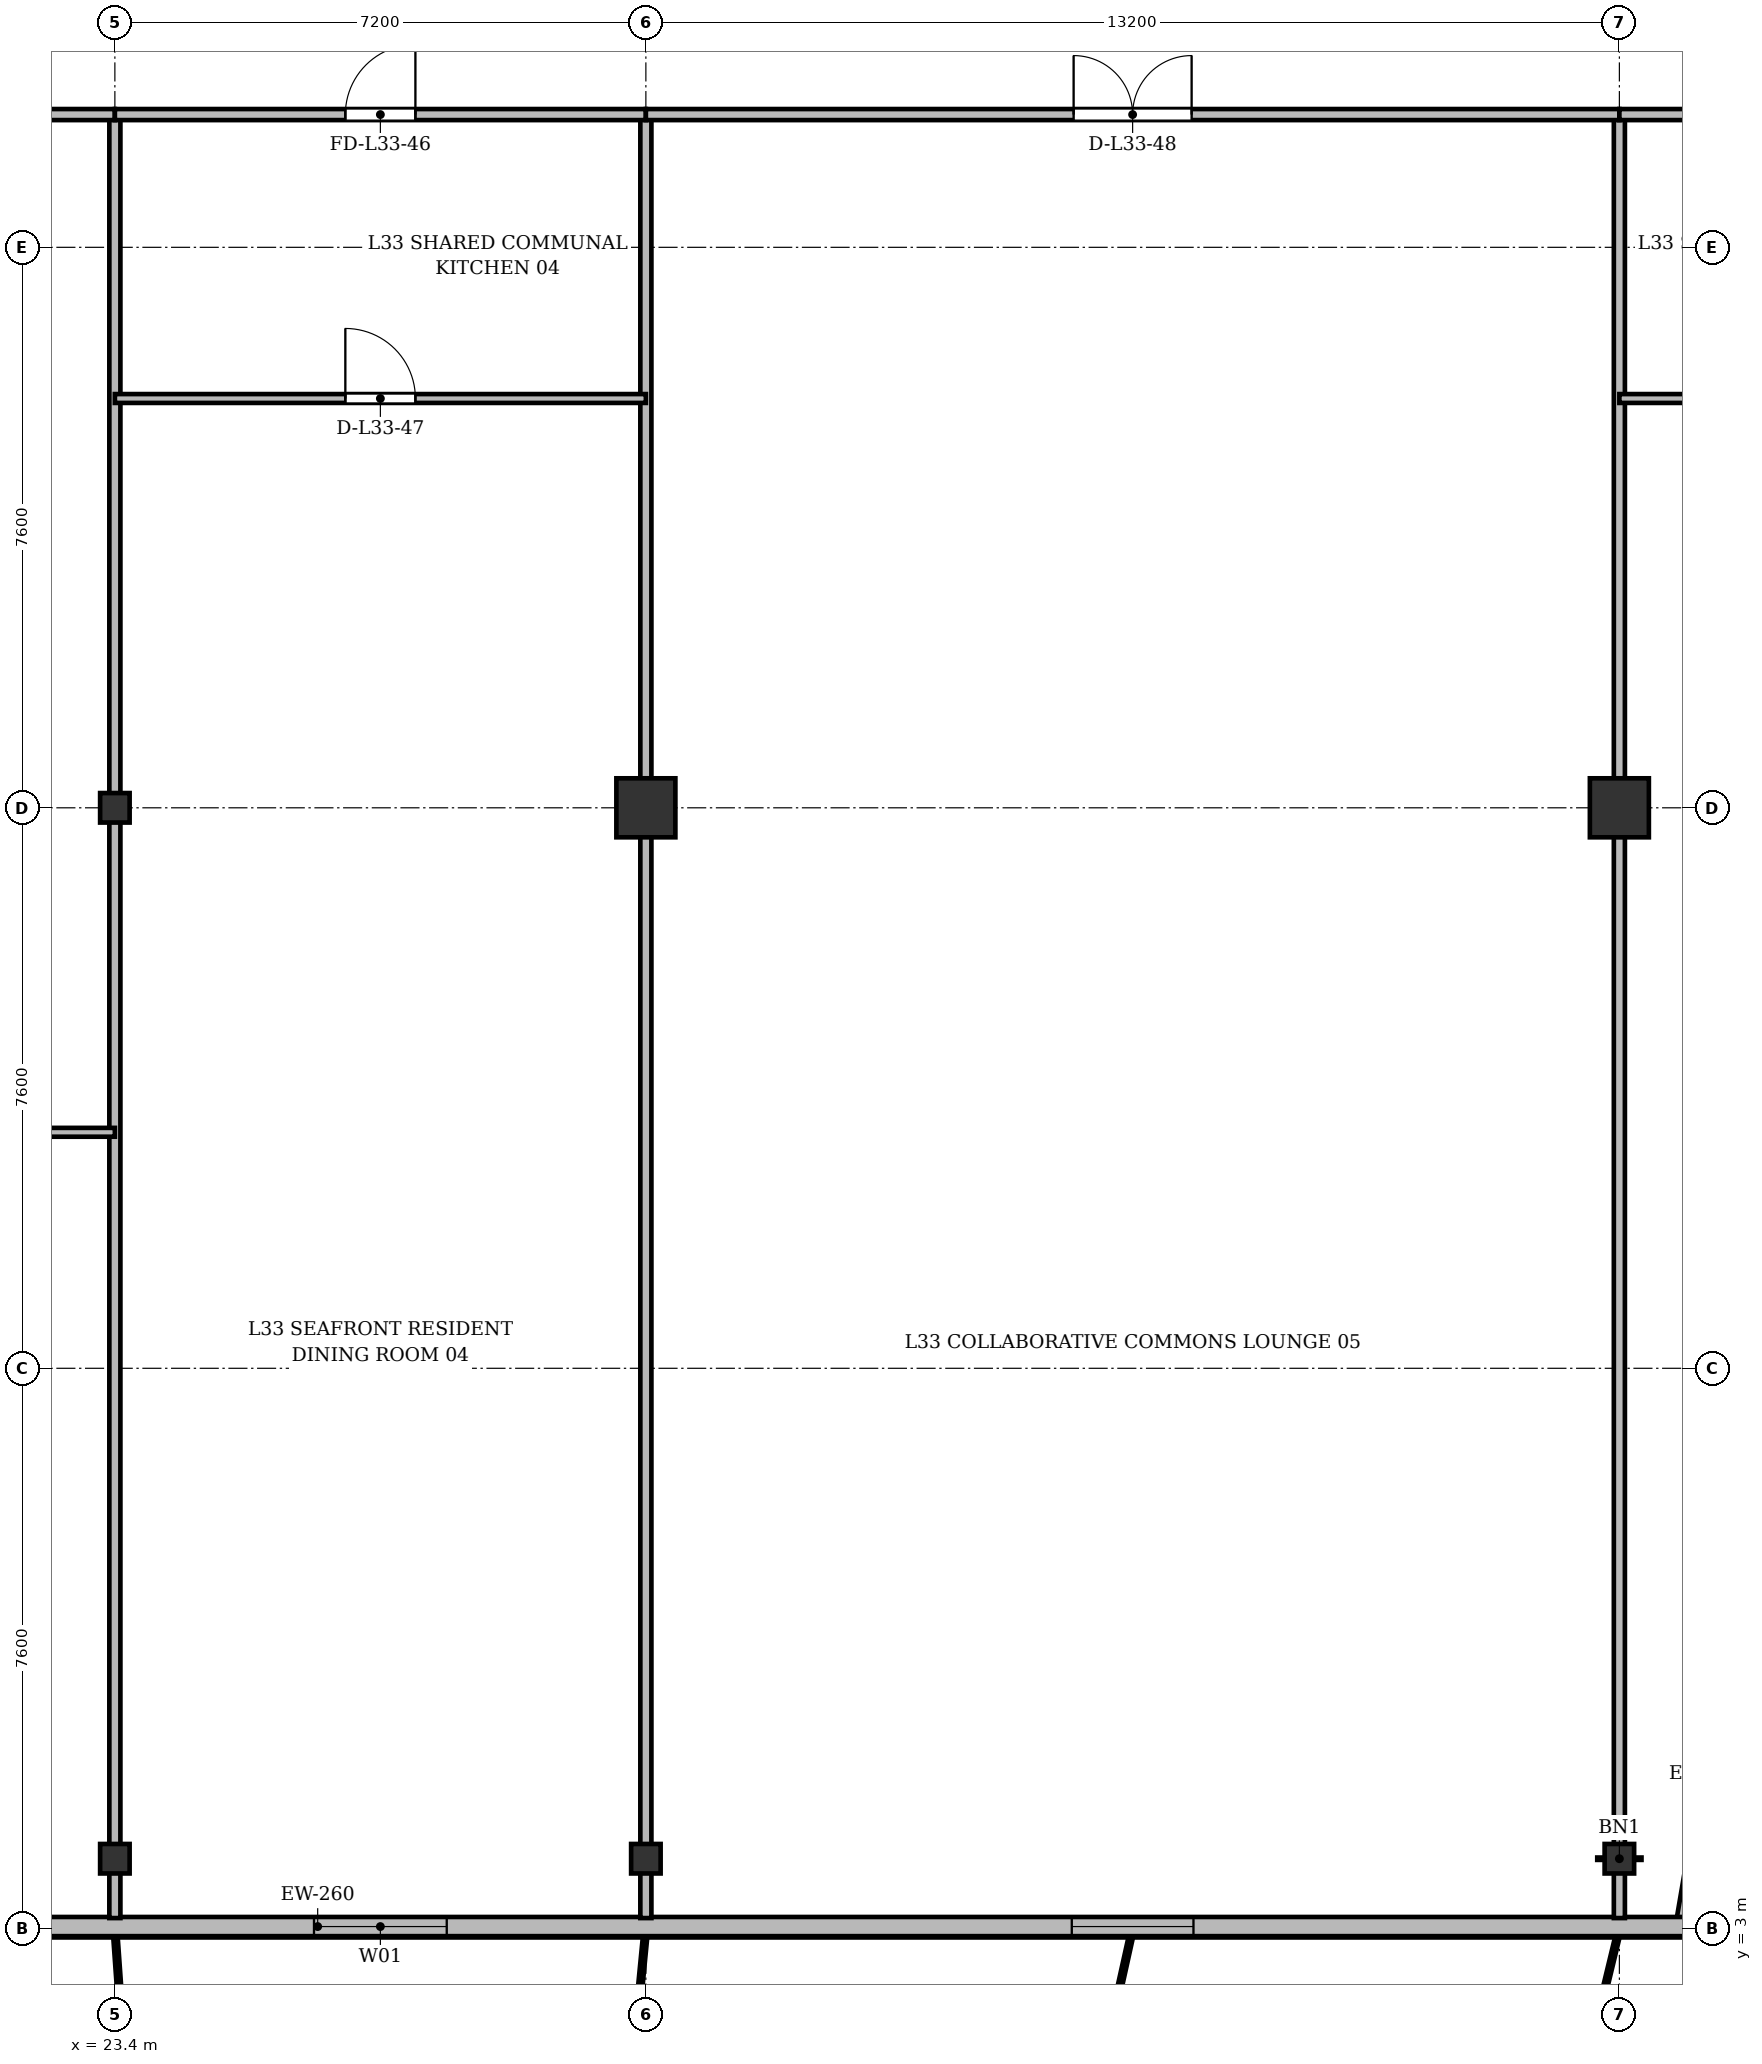
"""IFC4 building model, lengths in metres.
Left out: names, types, materials, properties, quantities, classifications, styles, units other than length and angle.
Written with IfcOpenShell. Run it as: python <this file> out.ifc"""

import sys

from ifc_helpers import new_model, si_unit, direction, frame, frame_2d, origin, origin_2d, place, context, subcontext, project, spatial, rectangle, i_section, extrude, source, transform, mapped, element, fill, save


model = new_model("IFC4")
c1 = context("Model", 3, precision=1e-05, world=origin(), true_north=direction((0.0, 1.0)))
c2 = subcontext(c1, "Body", "Model", "MODEL_VIEW")
j1 = project(units=[si_unit("LENGTHUNIT", "METRE"), si_unit("PLANEANGLEUNIT", "RADIAN")], contexts=[c1])
p1 = place(None, origin())
s1 = spatial("IfcSite", under=j1, at=p1, CompositionType="ELEMENT")
p2 = place(p1, origin())
s2 = spatial("IfcBuilding", under=s1, at=p2, CompositionType="ELEMENT")
p3 = place(p2, frame((0.0, 0.0, 128.5)))
s3 = spatial("IfcBuildingStorey", under=s2, at=p3, CompositionType="ELEMENT", Elevation=128.5)
m1 = source(origin(), c2, "Body", "SweptSolid", [
    extrude(i_section(OverallWidth=0.4, OverallDepth=0.4, WebThickness=0.022, FlangeThickness=0.035, at=origin_2d()), origin(), (0.0, 0.0, 1.0), 3.6),
])
for number, where, z_axis, x_axis in (
    (1, (23.4, 3.95, 0.0), (0.0, 0.0, 1.0), (1.0, 0.0, 0.0)),
    (2, (23.4, 18.2, 0.0), (0.0, 0.0, 1.0), (1.0, 0.0, 0.0)),
    (3, (30.6, 3.95, 0.0), (0.0, 0.0, 1.0), (1.0, 0.0, 0.0)),
):
    element("IfcColumn", number, at=place(p3, frame(where, z_axis=z_axis, x_axis=x_axis)), inside=s3, PredefinedType="COLUMN", context=c2, shape_type="MappedRepresentation", body=[
        mapped(m1, transform((0.0, 0.0, 0.0), x_axis=(1.0, 0.0, 0.0), y_axis=(0.0, 1.0, 0.0), z_axis=(0.0, 0.0, 1.0), scale=1.0)),
    ])
m2 = source(origin(), c2, "Body", "SweptSolid", [
    extrude(rectangle(XDim=0.8, YDim=0.8, at=origin_2d()), origin(), (0.0, 0.0, 1.0), 3.6),
])
p4 = place(p3, frame((30.6, 18.2, 0.0), z_axis=(0.0, 0.0, 1.0), x_axis=(1.0, 0.0, 0.0)))
e4 = element("IfcColumn", 4, at=p4, inside=s3, PredefinedType="COLUMN", context=c2, shape_type="MappedRepresentation", body=[
    mapped(m2, transform((0.0, 0.0, 0.0), x_axis=(1.0, 0.0, 0.0), y_axis=(0.0, 1.0, 0.0), z_axis=(0.0, 0.0, 1.0), scale=1.0)),
])
p5 = place(p3, frame((43.8, 3.95, 0.0), z_axis=(0.0, 0.0, 1.0), x_axis=(1.0, 0.0, 0.0)))
e5 = element("IfcColumn", 5, at=p5, inside=s3, PredefinedType="COLUMN", context=c2, shape_type="MappedRepresentation", body=[
    mapped(m1, transform((0.0, 0.0, 0.0), x_axis=(1.0, 0.0, 0.0), y_axis=(0.0, 1.0, 0.0), z_axis=(0.0, 0.0, 1.0), scale=1.0)),
])
p6 = place(p3, frame((43.8, 18.2, 0.0), z_axis=(0.0, 0.0, 1.0), x_axis=(1.0, 0.0, 0.0)))
e6 = element("IfcColumn", 6, at=p6, inside=s3, PredefinedType="COLUMN", context=c2, shape_type="MappedRepresentation", body=[
    mapped(m2, transform((0.0, 0.0, 0.0), x_axis=(1.0, 0.0, 0.0), y_axis=(0.0, 1.0, 0.0), z_axis=(0.0, 0.0, 1.0), scale=1.0)),
])
p7 = place(p3, frame((45.272, 6.422, 0.0), z_axis=(0.0, 0.0, 1.0), x_axis=(-0.168990530437, -0.98561767467, 0.0)))
e7 = element("IfcWall", 7, at=p7, inside=s3, PredefinedType="SOLIDWALL", context=c2, shape_type="SweptSolid", body=[
    extrude(rectangle(XDim=3.551, YDim=0.26, at=frame_2d((1.775, 0.0))), origin(), (0.0, 0.0, 1.0), 2.632),
])
p8 = place(p3, frame((44.8, 3.03, 0.0), z_axis=(0.0, 0.0, 1.0), x_axis=(-1.0, 0.0, 0.0)))
e8 = element("IfcWall", 8, at=p8, inside=s3, PredefinedType="SOLIDWALL", context=c2, shape_type="SweptSolid", body=[
    extrude(rectangle(XDim=37.3, YDim=0.26, at=frame_2d((18.65, 0.0))), origin(), (0.0, 0.0, 1.0), 3.22),
])
p9 = place(p8, frame((6.775, 0.0, 0.9)))
e9 = element("IfcOpeningElement", 9, at=p9, cuts=e8, PredefinedType="OPENING", context=c2, shape_type="SweptSolid", body=[
    extrude(rectangle(XDim=1.65, YDim=1.85, at=frame_2d((0.825, 0.925))), frame((0.0, 0.14, 0.0), z_axis=(0.0, -1.0, 0.0), x_axis=(1.0, 0.0, 0.0)), (0.0, 0.0, 1.0), 0.28),
])
p10 = place(p8, frame((16.9, 0.0, 0.9)))
e10 = element("IfcOpeningElement", 10, at=p10, cuts=e8, PredefinedType="OPENING", context=c2, shape_type="SweptSolid", body=[
    extrude(rectangle(XDim=1.8, YDim=1.8, at=frame_2d((0.9, 0.9))), frame((0.0, 0.14, 0.0), z_axis=(0.0, -1.0, 0.0), x_axis=(1.0, 0.0, 0.0)), (0.0, 0.0, 1.0), 0.28),
])
p11 = place(p8, frame((23.4, 0.0, 0.9)))
e11 = element("IfcOpeningElement", 11, at=p11, cuts=e8, PredefinedType="OPENING", context=c2, shape_type="SweptSolid", body=[
    extrude(rectangle(XDim=2.2, YDim=1.8, at=frame_2d((1.1, 0.9))), frame((0.0, 0.14, 0.0), z_axis=(0.0, -1.0, 0.0), x_axis=(1.0, 0.0, 0.0)), (0.0, 0.0, 1.0), 0.28),
])
p12 = place(p8, frame((30.15, 0.0, 0.9)))
e12 = element("IfcOpeningElement", 12, at=p12, cuts=e8, PredefinedType="OPENING", context=c2, shape_type="SweptSolid", body=[
    extrude(rectangle(XDim=1.5, YDim=1.75, at=frame_2d((0.75, 0.875))), frame((0.0, 0.14, 0.0), z_axis=(0.0, -1.0, 0.0), x_axis=(1.0, 0.0, 0.0)), (0.0, 0.0, 1.0), 0.28),
])
p13 = place(p8, frame((34.705, 0.0, 0.9)))
e13 = element("IfcOpeningElement", 13, at=p13, cuts=e8, PredefinedType="OPENING", context=c2, shape_type="SweptSolid", body=[
    extrude(rectangle(XDim=2.0, YDim=1.95, at=frame_2d((1.0, 0.975))), frame((0.0, 0.14, 0.0), z_axis=(0.0, -1.0, 0.0), x_axis=(1.0, 0.0, 0.0)), (0.0, 0.0, 1.0), 0.28),
])
for number, where, z_axis, x_axis in (
    (14, (23.4, 3.145, 0.0), (0.0, 0.0, 1.0), (0.0, 1.0, 0.0)),
    (15, (30.6, 3.145, 0.0), (0.0, 0.0, 1.0), (0.0, 1.0, 0.0)),
    (16, (43.8, 3.145, 0.0), (0.0, 0.0, 1.0), (0.0, 1.0, 0.0)),
):
    element("IfcWall", number, at=place(p3, frame(where, z_axis=z_axis, x_axis=x_axis)), inside=s3, PredefinedType="PARTITIONING", context=c2, shape_type="SweptSolid", body=[
        extrude(rectangle(XDim=24.455, YDim=0.15, at=frame_2d((12.228, 0.0))), origin(), (0.0, 0.0, 1.0), 2.72),
    ])
p14 = place(p3, frame((17.2, 27.6, 0.0), z_axis=(0.0, 0.0, 1.0), x_axis=(1.0, 0.0, 0.0)))
e17 = element("IfcWall", 17, at=p14, inside=s3, PredefinedType="PARTITIONING", context=c2, shape_type="SweptSolid", body=[
    extrude(rectangle(XDim=6.2, YDim=0.15, at=frame_2d((3.1, 0.0))), origin(), (0.0, 0.0, 1.0), 2.72),
])
p15 = place(p14, frame((2.625, 0.0, 0.0)))
e18 = element("IfcOpeningElement", 18, at=p15, cuts=e17, PredefinedType="OPENING", context=c2, shape_type="SweptSolid", body=[
    extrude(rectangle(XDim=0.95, YDim=2.15, at=frame_2d((0.475, 1.075))), frame((0.0, 0.085, 0.0), z_axis=(0.0, -1.0, 0.0), x_axis=(1.0, 0.0, 0.0)), (0.0, 0.0, 1.0), 0.17),
])
p16 = place(p3, frame((17.2, 13.8, 0.0), z_axis=(0.0, 0.0, 1.0), x_axis=(1.0, 0.0, 0.0)))
e19 = element("IfcWall", 19, at=p16, inside=s3, PredefinedType="PARTITIONING", context=c2, shape_type="SweptSolid", body=[
    extrude(rectangle(XDim=6.2, YDim=0.12, at=frame_2d((3.1, 0.0))), origin(), (0.0, 0.0, 1.0), 2.72),
])
p17 = place(p16, frame((2.625, 0.0, 0.0)))
e20 = element("IfcOpeningElement", 20, at=p17, cuts=e19, PredefinedType="OPENING", context=c2, shape_type="SweptSolid", body=[
    extrude(rectangle(XDim=0.95, YDim=2.15, at=frame_2d((0.475, 1.075))), frame((0.0, 0.07, 0.0), z_axis=(0.0, -1.0, 0.0), x_axis=(1.0, 0.0, 0.0)), (0.0, 0.0, 1.0), 0.14),
])
p18 = place(p3, frame((23.4, 27.6, 0.0), z_axis=(0.0, 0.0, 1.0), x_axis=(1.0, 0.0, 0.0)))
e21 = element("IfcWall", 21, at=p18, inside=s3, PredefinedType="PARTITIONING", context=c2, shape_type="SweptSolid", body=[
    extrude(rectangle(XDim=7.2, YDim=0.15, at=frame_2d((3.6, 0.0))), origin(), (0.0, 0.0, 1.0), 2.72),
])
p19 = place(p18, frame((3.125, 0.0, 0.0)))
e22 = element("IfcOpeningElement", 22, at=p19, cuts=e21, PredefinedType="OPENING", context=c2, shape_type="SweptSolid", body=[
    extrude(rectangle(XDim=0.95, YDim=2.15, at=frame_2d((0.475, 1.075))), frame((0.0, 0.085, 0.0), z_axis=(0.0, -1.0, 0.0), x_axis=(1.0, 0.0, 0.0)), (0.0, 0.0, 1.0), 0.17),
])
p20 = place(p3, frame((23.4, 23.75, 0.0), z_axis=(0.0, 0.0, 1.0), x_axis=(1.0, 0.0, 0.0)))
e23 = element("IfcWall", 23, at=p20, inside=s3, PredefinedType="PARTITIONING", context=c2, shape_type="SweptSolid", body=[
    extrude(rectangle(XDim=7.2, YDim=0.12, at=frame_2d((3.6, 0.0))), origin(), (0.0, 0.0, 1.0), 2.72),
])
p21 = place(p20, frame((3.125, 0.0, 0.0)))
e24 = element("IfcOpeningElement", 24, at=p21, cuts=e23, PredefinedType="OPENING", context=c2, shape_type="SweptSolid", body=[
    extrude(rectangle(XDim=0.95, YDim=2.15, at=frame_2d((0.475, 1.075))), frame((0.0, 0.07, 0.0), z_axis=(0.0, -1.0, 0.0), x_axis=(1.0, 0.0, 0.0)), (0.0, 0.0, 1.0), 0.14),
])
p22 = place(p3, frame((30.6, 27.6, 0.0), z_axis=(0.0, 0.0, 1.0), x_axis=(1.0, 0.0, 0.0)))
e25 = element("IfcWall", 25, at=p22, inside=s3, PredefinedType="PARTITIONING", context=c2, shape_type="SweptSolid", body=[
    extrude(rectangle(XDim=13.2, YDim=0.15, at=frame_2d((6.6, 0.0))), origin(), (0.0, 0.0, 1.0), 2.72),
])
p23 = place(p22, frame((5.8, 0.0, 0.0)))
e26 = element("IfcOpeningElement", 26, at=p23, cuts=e25, PredefinedType="OPENING", context=c2, shape_type="SweptSolid", body=[
    extrude(rectangle(XDim=1.6, YDim=2.2, at=frame_2d((0.8, 1.1))), frame((0.0, 0.085, 0.0), z_axis=(0.0, -1.0, 0.0), x_axis=(1.0, 0.0, 0.0)), (0.0, 0.0, 1.0), 0.17),
])
p24 = place(p3, frame((43.8, 27.6, 0.0), z_axis=(0.0, 0.0, 1.0), x_axis=(1.0, 0.0, 0.0)))
e27 = element("IfcWall", 27, at=p24, inside=s3, PredefinedType="PARTITIONING", context=c2, shape_type="SweptSolid", body=[
    extrude(rectangle(XDim=7.2, YDim=0.15, at=frame_2d((3.6, 0.0))), origin(), (0.0, 0.0, 1.0), 2.72),
])
p25 = place(p24, frame((3.125, 0.0, 0.0)))
e28 = element("IfcOpeningElement", 28, at=p25, cuts=e27, PredefinedType="OPENING", context=c2, shape_type="SweptSolid", body=[
    extrude(rectangle(XDim=0.95, YDim=2.15, at=frame_2d((0.475, 1.075))), frame((0.0, 0.085, 0.0), z_axis=(0.0, -1.0, 0.0), x_axis=(1.0, 0.0, 0.0)), (0.0, 0.0, 1.0), 0.17),
])
p26 = place(p3, frame((43.8, 23.75, 0.0), z_axis=(0.0, 0.0, 1.0), x_axis=(1.0, 0.0, 0.0)))
e29 = element("IfcWall", 29, at=p26, inside=s3, PredefinedType="PARTITIONING", context=c2, shape_type="SweptSolid", body=[
    extrude(rectangle(XDim=7.2, YDim=0.12, at=frame_2d((3.6, 0.0))), origin(), (0.0, 0.0, 1.0), 2.72),
])
p27 = place(p26, frame((3.125, 0.0, 0.0)))
e30 = element("IfcOpeningElement", 30, at=p27, cuts=e29, PredefinedType="OPENING", context=c2, shape_type="SweptSolid", body=[
    extrude(rectangle(XDim=0.95, YDim=2.15, at=frame_2d((0.475, 1.075))), frame((0.0, 0.07, 0.0), z_axis=(0.0, -1.0, 0.0), x_axis=(1.0, 0.0, 0.0)), (0.0, 0.0, 1.0), 0.14),
])
m3 = source(origin(), c2, "Body", "SweptSolid", [
    extrude(rectangle(XDim=1.65, YDim=1.85, at=frame_2d((0.825, 0.925))), frame((0.0, 0.03, 0.0), z_axis=(0.0, -1.0, 0.0), x_axis=(1.0, 0.0, 0.0)), (0.0, 0.0, 1.0), 0.06),
])
p28 = place(p9, origin())
e31 = element("IfcWindow", 31, at=p28, inside=s3, PartitioningType="SINGLE_PANEL", PredefinedType="WINDOW", context=c2, shape_type="MappedRepresentation", body=[
    mapped(m3, transform((0.0, 0.0, 0.0), x_axis=(1.0, 0.0, 0.0), y_axis=(0.0, 1.0, 0.0), z_axis=(0.0, 0.0, 1.0), scale=1.0)),
])
fill(e9, e31)
m4 = source(origin(), c2, "Body", "SweptSolid", [
    extrude(rectangle(XDim=1.8, YDim=1.8, at=frame_2d((0.9, 0.9))), frame((0.0, 0.03, 0.0), z_axis=(0.0, -1.0, 0.0), x_axis=(1.0, 0.0, 0.0)), (0.0, 0.0, 1.0), 0.06),
])
p29 = place(p10, origin())
e32 = element("IfcWindow", 32, at=p29, inside=s3, PartitioningType="SINGLE_PANEL", PredefinedType="WINDOW", context=c2, shape_type="MappedRepresentation", body=[
    mapped(m4, transform((0.0, 0.0, 0.0), x_axis=(1.0, 0.0, 0.0), y_axis=(0.0, 1.0, 0.0), z_axis=(0.0, 0.0, 1.0), scale=1.0)),
])
fill(e10, e32)
m5 = source(origin(), c2, "Body", "SweptSolid", [
    extrude(rectangle(XDim=0.95, YDim=2.15, at=frame_2d((0.475, 1.075))), frame((0.0, 0.025, 0.0), z_axis=(0.0, -1.0, 0.0), x_axis=(1.0, 0.0, 0.0)), (0.0, 0.0, 1.0), 0.05),
])
p30 = place(p19, origin())
e33 = element("IfcDoor", 33, at=p30, inside=s3, OperationType="SINGLE_SWING_RIGHT", PredefinedType="DOOR", context=c2, shape_type="MappedRepresentation", body=[
    mapped(m5, transform((0.0, 0.0, 0.0), x_axis=(1.0, 0.0, 0.0), y_axis=(0.0, 1.0, 0.0), z_axis=(0.0, 0.0, 1.0), scale=1.0)),
])
fill(e22, e33)
p31 = place(p21, origin())
e34 = element("IfcDoor", 34, at=p31, inside=s3, OperationType="SINGLE_SWING_LEFT", PredefinedType="DOOR", context=c2, shape_type="MappedRepresentation", body=[
    mapped(m5, transform((0.0, 0.0, 0.0), x_axis=(1.0, 0.0, 0.0), y_axis=(0.0, 1.0, 0.0), z_axis=(0.0, 0.0, 1.0), scale=1.0)),
])
fill(e24, e34)
m6 = source(origin(), c2, "Body", "SweptSolid", [
    extrude(rectangle(XDim=1.6, YDim=2.2, at=frame_2d((0.8, 1.1))), frame((0.0, 0.025, 0.0), z_axis=(0.0, -1.0, 0.0), x_axis=(1.0, 0.0, 0.0)), (0.0, 0.0, 1.0), 0.05),
])
p32 = place(p23, origin())
e35 = element("IfcDoor", 35, at=p32, inside=s3, OperationType="DOUBLE_DOOR_SINGLE_SWING", PredefinedType="DOOR", context=c2, shape_type="MappedRepresentation", body=[
    mapped(m6, transform((0.0, 0.0, 0.0), x_axis=(1.0, 0.0, 0.0), y_axis=(0.0, 1.0, 0.0), z_axis=(0.0, 0.0, 1.0), scale=1.0)),
])
fill(e26, e35)
save(model, sys.argv[1])
